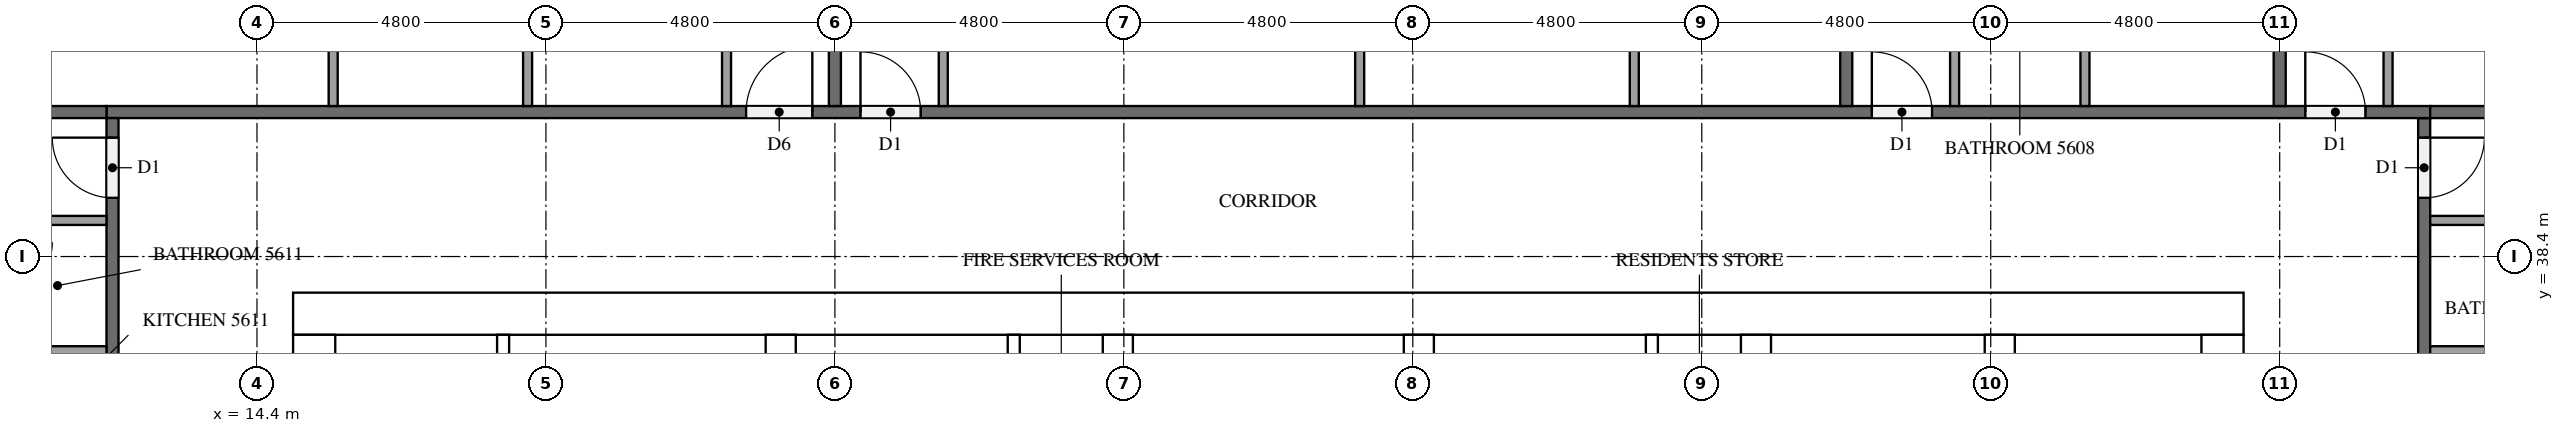
"""IFC4 building model, lengths in metres.
Left out: names, types, materials, properties, quantities, classifications, styles, units other than length and angle.
Written with IfcOpenShell. Run it as: python <this file> out.ifc"""

import sys

from ifc_helpers import new_model, si_unit, direction, frame, frame_2d, origin, place, context, subcontext, project, spatial, rectangle, extrude, element, fill, save


model = new_model("IFC4")
c1 = context("Model", 3, precision=1e-05, world=origin(), true_north=direction((0.0, 1.0)))
c2 = subcontext(c1, "Body", "Model", "MODEL_VIEW")
j1 = project(units=[si_unit("LENGTHUNIT", "METRE"), si_unit("PLANEANGLEUNIT", "RADIAN")], contexts=[c1])
p1 = place(None, origin())
s1 = spatial("IfcSite", under=j1, at=p1, CompositionType="ELEMENT")
p2 = place(p1, origin())
s2 = spatial("IfcBuilding", under=s1, at=p2, CompositionType="ELEMENT")
p3 = place(p2, frame((0.0, 0.0, 215.8)))
s3 = spatial("IfcBuildingStorey", under=s2, at=p3, CompositionType="ELEMENT", Elevation=215.8)
p4 = place(p3, frame((15.0, 37.45, 0.0), z_axis=(0.0, 0.0, 1.0), x_axis=(1.0, 0.0, 0.0)))
e1 = element("IfcWall", 1, at=p4, inside=s3, PredefinedType="SHEAR", context=c2, shape_type="SweptSolid", body=[
    extrude(rectangle(XDim=32.4, YDim=0.7, at=frame_2d((16.2, 0.0))), origin(), (0.0, 0.0, 1.0), 3.2),
])
p5 = place(p4, frame((15.3, 0.0, 0.0)))
e2 = element("IfcOpeningElement", 2, at=p5, cuts=e1, PredefinedType="OPENING", context=c2, shape_type="SweptSolid", body=[
    extrude(rectangle(XDim=1.8, YDim=2.1, at=frame_2d((0.9, 1.05))), frame((0.0, 0.36, 0.0), z_axis=(0.0, -1.0, 0.0), x_axis=(1.0, 0.0, 0.0)), (0.0, 0.0, 1.0), 0.72),
])
p6 = place(p4, frame((1.544, 0.0, 0.0)))
e3 = element("IfcOpeningElement", 3, at=p6, cuts=e1, PredefinedType="OPENING", context=c2, shape_type="SweptSolid", body=[
    extrude(rectangle(XDim=1.0, YDim=2.1, at=frame_2d((0.5, 1.05))), frame((0.0, 0.36, 0.0), z_axis=(0.0, -1.0, 0.0), x_axis=(1.0, 0.0, 0.0)), (0.0, 0.0, 1.0), 0.72),
])
p7 = place(p4, frame((5.219, 0.0, 0.0)))
e4 = element("IfcOpeningElement", 4, at=p7, cuts=e1, PredefinedType="OPENING", context=c2, shape_type="SweptSolid", body=[
    extrude(rectangle(XDim=1.0, YDim=2.1, at=frame_2d((0.5, 1.05))), frame((0.0, 0.36, 0.0), z_axis=(0.0, -1.0, 0.0), x_axis=(1.0, 0.0, 0.0)), (0.0, 0.0, 1.0), 0.72),
])
p8 = place(p3, frame((15.35, 15.7, 0.0), z_axis=(0.0, 0.0, 1.0), x_axis=(0.0, 1.0, 0.0)))
e5 = element("IfcWall", 5, at=p8, inside=s3, PredefinedType="SHEAR", context=c2, shape_type="SweptSolid", body=[
    extrude(rectangle(XDim=21.4, YDim=0.7, at=frame_2d((10.7, 0.0))), origin(), (0.0, 0.0, 1.0), 3.2),
])
p9 = place(p8, frame((5.06, 0.0, 0.0)))
e6 = element("IfcOpeningElement", 6, at=p9, cuts=e5, PredefinedType="OPENING", context=c2, shape_type="SweptSolid", body=[
    extrude(rectangle(XDim=1.2, YDim=2.1, at=frame_2d((0.6, 1.05))), frame((0.0, 0.36, 0.0), z_axis=(0.0, -1.0, 0.0), x_axis=(1.0, 0.0, 0.0)), (0.0, 0.0, 1.0), 0.72),
])
p10 = place(p3, frame((47.05, 15.7, 0.0), z_axis=(0.0, 0.0, 1.0), x_axis=(0.0, 1.0, 0.0)))
e7 = element("IfcWall", 7, at=p10, inside=s3, PredefinedType="SHEAR", context=c2, shape_type="SweptSolid", body=[
    extrude(rectangle(XDim=21.4, YDim=0.7, at=frame_2d((10.7, 0.0))), origin(), (0.0, 0.0, 1.0), 3.2),
])
p11 = place(p10, frame((10.4, 0.0, 0.0)))
e8 = element("IfcOpeningElement", 8, at=p11, cuts=e7, PredefinedType="OPENING", context=c2, shape_type="SweptSolid", body=[
    extrude(rectangle(XDim=1.2, YDim=2.1, at=frame_2d((0.6, 1.05))), frame((0.0, 0.36, 0.0), z_axis=(0.0, -1.0, 0.0), x_axis=(1.0, 0.0, 0.0)), (0.0, 0.0, 1.0), 0.72),
])
p12 = place(p3, frame((23.1, 15.7, 0.0), z_axis=(0.0, 0.0, 1.0), x_axis=(0.0, 1.0, 0.0)))
e9 = element("IfcWall", 9, at=p12, inside=s3, PredefinedType="SHEAR", context=c2, shape_type="SweptSolid", body=[
    extrude(rectangle(XDim=21.4, YDim=0.5, at=frame_2d((10.7, 0.0))), origin(), (0.0, 0.0, 1.0), 3.2),
])
p13 = place(p3, frame((39.3, 27.75, 0.0), z_axis=(0.0, 0.0, 1.0), x_axis=(0.0, 1.0, 0.0)))
e10 = element("IfcWall", 10, at=p13, inside=s3, PredefinedType="SHEAR", context=c2, shape_type="SweptSolid", body=[
    extrude(rectangle(XDim=9.35, YDim=0.5, at=frame_2d((4.675, 0.0))), origin(), (0.0, 0.0, 1.0), 3.2),
])
p14 = place(p3, frame((43.35, 27.75, 0.0), z_axis=(0.0, 0.0, 1.0), x_axis=(0.0, 1.0, 0.0)))
e11 = element("IfcWall", 11, at=p14, inside=s3, PredefinedType="SHEAR", context=c2, shape_type="SweptSolid", body=[
    extrude(rectangle(XDim=9.35, YDim=0.5, at=frame_2d((4.675, 0.0))), origin(), (0.0, 0.0, 1.0), 3.2),
])
p15 = place(p14, frame((7.65, 0.0, 0.0)))
e12 = element("IfcOpeningElement", 12, at=p15, cuts=e11, PredefinedType="OPENING", context=c2, shape_type="SweptSolid", body=[
    extrude(rectangle(XDim=1.2, YDim=2.1, at=frame_2d((0.6, 1.05))), frame((0.0, 0.26, 0.0), z_axis=(0.0, -1.0, 0.0), x_axis=(1.0, 0.0, 0.0)), (0.0, 0.0, 1.0), 0.52),
])
for number, where, z_axis, x_axis in (
    (13, (28.7, 33.8, 0.0), (0.0, 0.0, 1.0), (0.0, 1.0, 0.0)),
    (14, (33.7, 33.8, 0.0), (0.0, 0.0, 1.0), (0.0, 1.0, 0.0)),
):
    element("IfcWall", number, at=place(p3, frame(where, z_axis=z_axis, x_axis=x_axis)), inside=s3, PredefinedType="SHEAR", context=c2, shape_type="SweptSolid", body=[
        extrude(rectangle(XDim=3.3, YDim=0.5, at=frame_2d((1.65, 0.0))), origin(), (0.0, 0.0, 1.0), 3.2),
    ])
p16 = place(p3, frame((18.489, 31.5, 0.0), z_axis=(0.0, 0.0, 1.0), x_axis=(0.0, 1.0, 0.0)))
e15 = element("IfcWall", 15, at=p16, inside=s3, PredefinedType="PARTITIONING", context=c2, shape_type="SweptSolid", body=[
    extrude(rectangle(XDim=5.6, YDim=0.2, at=frame_2d((2.8, 0.0))), origin(), (0.0, 0.0, 1.0), 3.2),
])
for number, where, z_axis, x_axis in (
    (16, (26.971, 33.8, 0.0), (0.0, 0.0, 1.0), (0.0, 1.0, 0.0)),
    (17, (37.571, 33.8, 0.0), (0.0, 0.0, 1.0), (0.0, 1.0, 0.0)),
):
    element("IfcWall", number, at=place(p3, frame(where, z_axis=z_axis, x_axis=x_axis)), inside=s3, PredefinedType="PARTITIONING", context=c2, shape_type="SweptSolid", body=[
        extrude(rectangle(XDim=3.3, YDim=0.2, at=frame_2d((1.65, 0.0))), origin(), (0.0, 0.0, 1.0), 3.2),
    ])
p17 = place(p3, frame((50.4, 40.7, 0.0), z_axis=(0.0, 0.0, 1.0), x_axis=(0.0, -1.0, 0.0)))
e18 = element("IfcWall", 18, at=p17, inside=s3, PredefinedType="PARTITIONING", context=c2, shape_type="SweptSolid", body=[
    extrude(rectangle(XDim=28.6, YDim=0.2, at=frame_2d((14.3, 0.0))), origin(), (0.0, 0.0, 1.0), 3.2),
])
p18 = place(p17, frame((19.525, 0.0, 0.0)))
e19 = element("IfcOpeningElement", 19, at=p18, cuts=e18, PredefinedType="OPENING", context=c2, shape_type="SweptSolid", body=[
    extrude(rectangle(XDim=1.0, YDim=2.1, at=frame_2d((0.5, 1.05))), frame((0.0, 0.11, 0.0), z_axis=(0.0, -1.0, 0.0), x_axis=(1.0, 0.0, 0.0)), (0.0, 0.0, 1.0), 0.22),
])
p19 = place(p17, frame((7.525, 0.0, 0.0)))
e20 = element("IfcOpeningElement", 20, at=p19, cuts=e18, PredefinedType="OPENING", context=c2, shape_type="SweptSolid", body=[
    extrude(rectangle(XDim=1.0, YDim=2.1, at=frame_2d((0.5, 1.05))), frame((0.0, 0.11, 0.0), z_axis=(0.0, -1.0, 0.0), x_axis=(1.0, 0.0, 0.0)), (0.0, 0.0, 1.0), 0.22),
])
p20 = place(p17, frame((0.325, 0.0, 0.0)))
e21 = element("IfcOpeningElement", 21, at=p20, cuts=e18, PredefinedType="OPENING", context=c2, shape_type="SweptSolid", body=[
    extrude(rectangle(XDim=1.0, YDim=2.1, at=frame_2d((0.5, 1.05))), frame((0.0, 0.11, 0.0), z_axis=(0.0, -1.0, 0.0), x_axis=(1.0, 0.0, 0.0)), (0.0, 0.0, 1.0), 0.22),
])
p21 = place(p3, frame((11.9, 40.8, 0.0), z_axis=(0.0, 0.0, 1.0), x_axis=(1.0, 0.0, 0.0)))
e22 = element("IfcWall", 22, at=p21, inside=s3, PredefinedType="PARTITIONING", context=c2, shape_type="SweptSolid", body=[
    extrude(rectangle(XDim=38.6, YDim=0.2, at=frame_2d((19.3, 0.0))), origin(), (0.0, 0.0, 1.0), 3.2),
])
p22 = place(p21, frame((36.525, 0.0, 0.0)))
e23 = element("IfcOpeningElement", 23, at=p22, cuts=e22, PredefinedType="OPENING", context=c2, shape_type="SweptSolid", body=[
    extrude(rectangle(XDim=1.0, YDim=2.1, at=frame_2d((0.5, 1.05))), frame((0.0, 0.11, 0.0), z_axis=(0.0, -1.0, 0.0), x_axis=(1.0, 0.0, 0.0)), (0.0, 0.0, 1.0), 0.22),
])
p23 = place(p21, frame((29.325, 0.0, 0.0)))
e24 = element("IfcOpeningElement", 24, at=p23, cuts=e22, PredefinedType="OPENING", context=c2, shape_type="SweptSolid", body=[
    extrude(rectangle(XDim=1.0, YDim=2.1, at=frame_2d((0.5, 1.05))), frame((0.0, 0.11, 0.0), z_axis=(0.0, -1.0, 0.0), x_axis=(1.0, 0.0, 0.0)), (0.0, 0.0, 1.0), 0.22),
])
p24 = place(p21, frame((12.525, 0.0, 0.0)))
e25 = element("IfcOpeningElement", 25, at=p24, cuts=e22, PredefinedType="OPENING", context=c2, shape_type="SweptSolid", body=[
    extrude(rectangle(XDim=1.0, YDim=2.1, at=frame_2d((0.5, 1.05))), frame((0.0, 0.11, 0.0), z_axis=(0.0, -1.0, 0.0), x_axis=(1.0, 0.0, 0.0)), (0.0, 0.0, 1.0), 0.22),
])
p25 = place(p21, frame((10.625, 0.0, 0.0)))
e26 = element("IfcOpeningElement", 26, at=p25, cuts=e22, PredefinedType="OPENING", context=c2, shape_type="SweptSolid", body=[
    extrude(rectangle(XDim=1.1, YDim=2.1, at=frame_2d((0.55, 1.05))), frame((0.0, 0.11, 0.0), z_axis=(0.0, -1.0, 0.0), x_axis=(1.0, 0.0, 0.0)), (0.0, 0.0, 1.0), 0.22),
])
p26 = place(p3, frame((12.0, 12.1, 0.0), z_axis=(0.0, 0.0, 1.0), x_axis=(0.0, 1.0, 0.0)))
e27 = element("IfcWall", 27, at=p26, inside=s3, PredefinedType="PARTITIONING", context=c2, shape_type="SweptSolid", body=[
    extrude(rectangle(XDim=28.6, YDim=0.2, at=frame_2d((14.3, 0.0))), origin(), (0.0, 0.0, 1.0), 3.2),
])
p27 = place(p26, frame((27.275, 0.0, 0.0)))
e28 = element("IfcOpeningElement", 28, at=p27, cuts=e27, PredefinedType="OPENING", context=c2, shape_type="SweptSolid", body=[
    extrude(rectangle(XDim=1.0, YDim=2.1, at=frame_2d((0.5, 1.05))), frame((0.0, 0.11, 0.0), z_axis=(0.0, -1.0, 0.0), x_axis=(1.0, 0.0, 0.0)), (0.0, 0.0, 1.0), 0.22),
])
p28 = place(p26, frame((12.325, 0.0, 0.0)))
e29 = element("IfcOpeningElement", 29, at=p28, cuts=e27, PredefinedType="OPENING", context=c2, shape_type="SweptSolid", body=[
    extrude(rectangle(XDim=1.0, YDim=2.1, at=frame_2d((0.5, 1.05))), frame((0.0, 0.11, 0.0), z_axis=(0.0, -1.0, 0.0), x_axis=(1.0, 0.0, 0.0)), (0.0, 0.0, 1.0), 0.22),
])
p29 = place(p26, frame((2.725, 0.0, 0.0)))
e30 = element("IfcOpeningElement", 30, at=p29, cuts=e27, PredefinedType="OPENING", context=c2, shape_type="SweptSolid", body=[
    extrude(rectangle(XDim=1.0, YDim=2.1, at=frame_2d((0.5, 1.05))), frame((0.0, 0.11, 0.0), z_axis=(0.0, -1.0, 0.0), x_axis=(1.0, 0.0, 0.0)), (0.0, 0.0, 1.0), 0.22),
])
p30 = place(p26, frame((0.875, 0.0, 0.0)))
e31 = element("IfcOpeningElement", 31, at=p30, cuts=e27, PredefinedType="OPENING", context=c2, shape_type="SweptSolid", body=[
    extrude(rectangle(XDim=1.0, YDim=2.1, at=frame_2d((0.5, 1.05))), frame((0.0, 0.11, 0.0), z_axis=(0.0, -1.0, 0.0), x_axis=(1.0, 0.0, 0.0)), (0.0, 0.0, 1.0), 0.22),
])
p31 = place(p3, frame((50.5, 40.8, 0.0), z_axis=(0.0, 0.0, 1.0), x_axis=(1.0, 0.0, 0.0)))
e32 = element("IfcWall", 32, at=p31, inside=s3, PredefinedType="PARTITIONING", context=c2, shape_type="SweptSolid", body=[
    extrude(rectangle(XDim=11.8, YDim=0.2, at=frame_2d((5.9, 0.0))), origin(), (0.0, 0.0, 1.0), 3.2),
])
p32 = place(p3, frame((48.0, 52.475, 0.0), z_axis=(0.0, 0.0, 1.0), x_axis=(0.0, -1.0, 0.0)))
e33 = element("IfcWall", 33, at=p32, inside=s3, PredefinedType="PARTITIONING", context=c2, shape_type="SweptSolid", body=[
    extrude(rectangle(XDim=11.575, YDim=0.2, at=frame_2d((5.788, 0.0))), origin(), (0.0, 0.0, 1.0), 3.2),
])
for number, where, z_axis, x_axis in (
    (34, (40.8, 52.7, 0.0), (0.0, 0.0, 1.0), (0.0, -1.0, 0.0)),
    (35, (24.0, 52.7, 0.0), (0.0, 0.0, 1.0), (0.0, -1.0, 0.0)),
):
    element("IfcWall", number, at=place(p3, frame(where, z_axis=z_axis, x_axis=x_axis)), inside=s3, PredefinedType="PARTITIONING", context=c2, shape_type="SweptSolid", body=[
        extrude(rectangle(XDim=11.8, YDim=0.2, at=frame_2d((5.9, 0.0))), origin(), (0.0, 0.0, 1.0), 3.2),
    ])
p33 = place(p3, frame((4.9, 40.8, 0.0), z_axis=(0.0, 0.0, 1.0), x_axis=(1.0, 0.0, 0.0)))
e36 = element("IfcWall", 36, at=p33, inside=s3, PredefinedType="PARTITIONING", context=c2, shape_type="SweptSolid", body=[
    extrude(rectangle(XDim=7.0, YDim=0.2, at=frame_2d((3.5, 0.0))), origin(), (0.0, 0.0, 1.0), 3.2),
])
p34 = place(p3, frame((50.5, 36.835, 0.0), z_axis=(0.0, 0.0, 1.0), x_axis=(1.0, 0.0, 0.0)))
e37 = element("IfcWall", 37, at=p34, inside=s3, PredefinedType="PARTITIONING", context=c2, shape_type="SweptSolid", body=[
    extrude(rectangle(XDim=2.975, YDim=0.15, at=frame_2d((1.488, 0.0))), origin(), (0.0, 0.0, 1.0), 3.2),
])
p35 = place(p3, frame((50.5, 39.0, 0.0), z_axis=(0.0, 0.0, 1.0), x_axis=(1.0, 0.0, 0.0)))
e38 = element("IfcWall", 38, at=p35, inside=s3, PredefinedType="PARTITIONING", context=c2, shape_type="SweptSolid", body=[
    extrude(rectangle(XDim=3.125, YDim=0.15, at=frame_2d((1.562, 0.0))), origin(), (0.0, 0.0, 1.0), 3.2),
])
p36 = place(p3, frame((49.8, 40.9, 0.0), z_axis=(0.0, 0.0, 1.0), x_axis=(0.0, 1.0, 0.0)))
e39 = element("IfcWall", 39, at=p36, inside=s3, PredefinedType="PARTITIONING", context=c2, shape_type="SweptSolid", body=[
    extrude(rectangle(XDim=3.425, YDim=0.15, at=frame_2d((1.712, 0.0))), origin(), (0.0, 0.0, 1.0), 3.2),
])
p37 = place(p3, frame((44.765, 40.9, 0.0), z_axis=(0.0, 0.0, 1.0), x_axis=(0.0, 1.0, 0.0)))
e40 = element("IfcWall", 40, at=p37, inside=s3, PredefinedType="PARTITIONING", context=c2, shape_type="SweptSolid", body=[
    extrude(rectangle(XDim=4.325, YDim=0.15, at=frame_2d((2.163, 0.0))), origin(), (0.0, 0.0, 1.0), 3.2),
])
p38 = place(p3, frame((42.6, 40.9, 0.0), z_axis=(0.0, 0.0, 1.0), x_axis=(0.0, 1.0, 0.0)))
e41 = element("IfcWall", 41, at=p38, inside=s3, PredefinedType="PARTITIONING", context=c2, shape_type="SweptSolid", body=[
    extrude(rectangle(XDim=4.475, YDim=0.15, at=frame_2d((2.238, 0.0))), origin(), (0.0, 0.0, 1.0), 3.2),
])
for number, where, z_axis, x_axis in (
    (42, (32.717, 40.9, 0.0), (0.0, 0.0, 1.0), (0.0, 1.0, 0.0)),
    (43, (37.279, 40.9, 0.0), (0.0, 0.0, 1.0), (0.0, 1.0, 0.0)),
):
    element("IfcWall", number, at=place(p3, frame(where, z_axis=z_axis, x_axis=x_axis)), inside=s3, PredefinedType="PARTITIONING", context=c2, shape_type="SweptSolid", body=[
        extrude(rectangle(XDim=4.175, YDim=0.15, at=frame_2d((2.087, 0.0))), origin(), (0.0, 0.0, 1.0), 3.2),
    ])
p39 = place(p3, frame((25.8, 40.9, 0.0), z_axis=(0.0, 0.0, 1.0), x_axis=(0.0, 1.0, 0.0)))
e44 = element("IfcWall", 44, at=p39, inside=s3, PredefinedType="PARTITIONING", context=c2, shape_type="SweptSolid", body=[
    extrude(rectangle(XDim=4.325, YDim=0.15, at=frame_2d((2.163, 0.0))), origin(), (0.0, 0.0, 1.0), 3.2),
])
for number, where, z_axis, x_axis in (
    (45, (18.895, 40.9, 0.0), (0.0, 0.0, 1.0), (0.0, 1.0, 0.0)),
    (46, (15.666, 40.9, 0.0), (0.0, 0.0, 1.0), (0.0, 1.0, 0.0)),
):
    element("IfcWall", number, at=place(p3, frame(where, z_axis=z_axis, x_axis=x_axis)), inside=s3, PredefinedType="PARTITIONING", context=c2, shape_type="SweptSolid", body=[
        extrude(rectangle(XDim=3.125, YDim=0.15, at=frame_2d((1.562, 0.0))), origin(), (0.0, 0.0, 1.0), 3.2),
    ])
p40 = place(p3, frame((22.2, 40.9, 0.0), z_axis=(0.0, 0.0, 1.0), x_axis=(0.0, 1.0, 0.0)))
e47 = element("IfcWall", 47, at=p40, inside=s3, PredefinedType="PARTITIONING", context=c2, shape_type="SweptSolid", body=[
    extrude(rectangle(XDim=3.275, YDim=0.15, at=frame_2d((1.638, 0.0))), origin(), (0.0, 0.0, 1.0), 3.2),
])
p41 = place(p3, frame((11.9, 36.835, 0.0), z_axis=(0.0, 0.0, 1.0), x_axis=(-1.0, 0.0, 0.0)))
e48 = element("IfcWall", 48, at=p41, inside=s3, PredefinedType="PARTITIONING", context=c2, shape_type="SweptSolid", body=[
    extrude(rectangle(XDim=1.625, YDim=0.15, at=frame_2d((0.812, 0.0))), origin(), (0.0, 0.0, 1.0), 3.2),
])
p42 = place(p3, frame((11.9, 39.0, 0.0), z_axis=(0.0, 0.0, 1.0), x_axis=(-1.0, 0.0, 0.0)))
e49 = element("IfcWall", 49, at=p42, inside=s3, PredefinedType="PARTITIONING", context=c2, shape_type="SweptSolid", body=[
    extrude(rectangle(XDim=1.775, YDim=0.15, at=frame_2d((0.887, 0.0))), origin(), (0.0, 0.0, 1.0), 3.2),
])
p43 = place(p5, origin())
e50 = element("IfcDoor", 50, at=p43, inside=s3, OperationType="DOUBLE_DOOR_SINGLE_SWING", PredefinedType="DOOR", context=c2, shape_type="SweptSolid", body=[
    extrude(rectangle(XDim=1.8, YDim=2.1, at=frame_2d((0.9, 1.05))), frame((0.0, 0.025, 0.0), z_axis=(0.0, -1.0, 0.0), x_axis=(1.0, 0.0, 0.0)), (0.0, 0.0, 1.0), 0.05),
])
fill(e2, e50)
p44 = place(p6, origin())
e51 = element("IfcDoor", 51, at=p44, inside=s3, OperationType="SINGLE_SWING_LEFT", PredefinedType="DOOR", context=c2, shape_type="SweptSolid", body=[
    extrude(rectangle(XDim=1.0, YDim=2.1, at=frame_2d((0.5, 1.05))), frame((0.0, 0.025, 0.0), z_axis=(0.0, -1.0, 0.0), x_axis=(1.0, 0.0, 0.0)), (0.0, 0.0, 1.0), 0.05),
])
fill(e3, e51)
p45 = place(p7, origin())
e52 = element("IfcDoor", 52, at=p45, inside=s3, OperationType="SINGLE_SWING_RIGHT", PredefinedType="DOOR", context=c2, shape_type="SweptSolid", body=[
    extrude(rectangle(XDim=1.0, YDim=2.1, at=frame_2d((0.5, 1.05))), frame((0.0, 0.025, 0.0), z_axis=(0.0, -1.0, 0.0), x_axis=(1.0, 0.0, 0.0)), (0.0, 0.0, 1.0), 0.05),
])
fill(e4, e52)
p46 = place(p20, origin())
e53 = element("IfcDoor", 53, at=p46, inside=s3, OperationType="SINGLE_SWING_LEFT", PredefinedType="DOOR", context=c2, shape_type="SweptSolid", body=[
    extrude(rectangle(XDim=1.0, YDim=2.1, at=frame_2d((0.5, 1.05))), frame((0.0, 0.025, 0.0), z_axis=(0.0, -1.0, 0.0), x_axis=(1.0, 0.0, 0.0)), (0.0, 0.0, 1.0), 0.05),
])
fill(e21, e53)
p47 = place(p22, origin())
e54 = element("IfcDoor", 54, at=p47, inside=s3, OperationType="SINGLE_SWING_LEFT", PredefinedType="DOOR", context=c2, shape_type="SweptSolid", body=[
    extrude(rectangle(XDim=1.0, YDim=2.1, at=frame_2d((0.5, 1.05))), frame((0.0, 0.025, 0.0), z_axis=(0.0, -1.0, 0.0), x_axis=(1.0, 0.0, 0.0)), (0.0, 0.0, 1.0), 0.05),
])
fill(e23, e54)
p48 = place(p23, origin())
e55 = element("IfcDoor", 55, at=p48, inside=s3, OperationType="SINGLE_SWING_LEFT", PredefinedType="DOOR", context=c2, shape_type="SweptSolid", body=[
    extrude(rectangle(XDim=1.0, YDim=2.1, at=frame_2d((0.5, 1.05))), frame((0.0, 0.025, 0.0), z_axis=(0.0, -1.0, 0.0), x_axis=(1.0, 0.0, 0.0)), (0.0, 0.0, 1.0), 0.05),
])
fill(e24, e55)
p49 = place(p24, origin())
e56 = element("IfcDoor", 56, at=p49, inside=s3, OperationType="SINGLE_SWING_LEFT", PredefinedType="DOOR", context=c2, shape_type="SweptSolid", body=[
    extrude(rectangle(XDim=1.0, YDim=2.1, at=frame_2d((0.5, 1.05))), frame((0.0, 0.025, 0.0), z_axis=(0.0, -1.0, 0.0), x_axis=(1.0, 0.0, 0.0)), (0.0, 0.0, 1.0), 0.05),
])
fill(e25, e56)
p50 = place(p25, origin())
e57 = element("IfcDoor", 57, at=p50, inside=s3, OperationType="SINGLE_SWING_RIGHT", PredefinedType="DOOR", context=c2, shape_type="SweptSolid", body=[
    extrude(rectangle(XDim=1.1, YDim=2.1, at=frame_2d((0.55, 1.05))), frame((0.0, 0.025, 0.0), z_axis=(0.0, -1.0, 0.0), x_axis=(1.0, 0.0, 0.0)), (0.0, 0.0, 1.0), 0.05),
])
fill(e26, e57)
p51 = place(p27, origin())
e58 = element("IfcDoor", 58, at=p51, inside=s3, OperationType="SINGLE_SWING_RIGHT", PredefinedType="DOOR", context=c2, shape_type="SweptSolid", body=[
    extrude(rectangle(XDim=1.0, YDim=2.1, at=frame_2d((0.5, 1.05))), frame((0.0, 0.025, 0.0), z_axis=(0.0, -1.0, 0.0), x_axis=(1.0, 0.0, 0.0)), (0.0, 0.0, 1.0), 0.05),
])
fill(e28, e58)
save(model, sys.argv[1])
